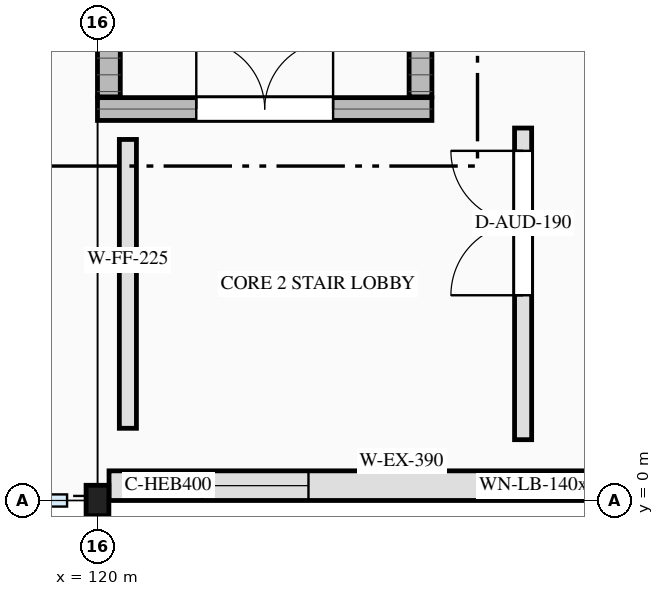
"""IFC4 building model, lengths in metres.
Left out: names, types, materials, properties, quantities, classifications, styles, units other than length and angle.
Written with IfcOpenShell. Run it as: python <this file> out.ifc"""

import sys

from ifc_helpers import new_model, si_unit, direction, frame, frame_2d, origin, origin_2d, place, context, subcontext, project, spatial, rectangle, i_section, extrude, element, fill, save


model = new_model("IFC4")
c1 = context("Model", 3, precision=1e-05, world=origin(), true_north=direction((0.0, 1.0)))
c2 = subcontext(c1, "Body", "Model", "MODEL_VIEW")
j1 = project(units=[si_unit("LENGTHUNIT", "METRE"), si_unit("PLANEANGLEUNIT", "RADIAN")], contexts=[c1])
p1 = place(None, origin())
s1 = spatial("IfcSite", under=j1, at=p1, CompositionType="ELEMENT")
p2 = place(p1, origin())
s2 = spatial("IfcBuilding", under=s1, at=p2, CompositionType="ELEMENT")
p3 = place(p2, frame((0.0, 0.0, 21.8)))
s3 = spatial("IfcBuildingStorey", under=s2, at=p3, CompositionType="ELEMENT", Elevation=21.8)
p4 = place(p3, frame((120.0, 5.15, 0.0), z_axis=(0.0, 0.0, 1.0), x_axis=(1.0, 0.0, 0.0)))
e1 = element("IfcWall", 1, at=p4, inside=s3, PredefinedType="SHEAR", context=c2, shape_type="SweptSolid", body=[
    extrude(rectangle(XDim=4.4, YDim=0.3, at=frame_2d((2.2, 0.0))), origin(), (0.0, 0.0, 1.0), 4.2),
])
p5 = place(p4, frame((1.3, 0.0, 0.0)))
e2 = element("IfcOpeningElement", 2, at=p5, cuts=e1, PredefinedType="OPENING", context=c2, shape_type="SweptSolid", body=[
    extrude(rectangle(XDim=1.8, YDim=2.2, at=frame_2d((0.9, 1.1))), frame((0.0, 0.16, 0.0), z_axis=(0.0, -1.0, 0.0), x_axis=(1.0, 0.0, 0.0)), (0.0, 0.0, 1.0), 0.32),
])
for number, where, z_axis, x_axis in (
    (3, (120.15, 5.31, 0.0), (0.0, 0.0, 1.0), (0.0, 1.0, 0.0)),
    (4, (124.25, 5.31, 0.0), (0.0, 0.0, 1.0), (0.0, 1.0, 0.0)),
):
    element("IfcWall", number, at=place(p3, frame(where, z_axis=z_axis, x_axis=x_axis)), inside=s3, PredefinedType="SHEAR", context=c2, shape_type="SweptSolid", body=[
        extrude(rectangle(XDim=9.38, YDim=0.3, at=frame_2d((4.69, 0.0))), origin(), (0.0, 0.0, 1.0), 4.2),
    ])
p6 = place(p3, frame((120.0, 0.0, 0.0), z_axis=(0.0, 0.0, 1.0), x_axis=(1.0, 0.0, 0.0)))
e5 = element("IfcColumn", 5, at=p6, inside=s3, PredefinedType="COLUMN", context=c2, shape_type="SweptSolid", body=[
    extrude(i_section(OverallWidth=0.3, OverallDepth=0.4, WebThickness=0.013, FlangeThickness=0.024, FilletRadius=0.027, at=origin_2d()), origin(), (0.0, 0.0, 1.0), 4.2),
])
p7 = place(p3, frame((127.848, 0.195, 0.0), z_axis=(0.0, 0.0, 1.0), x_axis=(-1.0, 0.0, 0.0)))
e6 = element("IfcWall", 6, at=p7, inside=s3, PredefinedType="SOLIDWALL", context=c2, shape_type="SweptSolid", body=[
    extrude(rectangle(XDim=7.696, YDim=0.39, at=frame_2d((3.848, 0.0))), origin(), (0.0, 0.0, 1.0), 3.415),
])
p8 = place(p7, frame((1.224, 0.0, 0.85)))
e7 = element("IfcOpeningElement", 7, at=p8, cuts=e6, PredefinedType="OPENING", context=c2, shape_type="SweptSolid", body=[
    extrude(rectangle(XDim=1.4, YDim=1.6, at=frame_2d((0.7, 0.8))), frame((0.0, 0.205, 0.0), z_axis=(0.0, -1.0, 0.0), x_axis=(1.0, 0.0, 0.0)), (0.0, 0.0, 1.0), 0.41),
])
p9 = place(p7, frame((5.072, 0.0, 0.85)))
e8 = element("IfcOpeningElement", 8, at=p9, cuts=e6, PredefinedType="OPENING", context=c2, shape_type="SweptSolid", body=[
    extrude(rectangle(XDim=1.4, YDim=1.6, at=frame_2d((0.7, 0.8))), frame((0.0, 0.205, 0.0), z_axis=(0.0, -1.0, 0.0), x_axis=(1.0, 0.0, 0.0)), (0.0, 0.0, 1.0), 0.41),
])
p10 = place(p3, frame((125.6, 0.8, 0.0), z_axis=(0.0, 0.0, 1.0), x_axis=(0.0, 1.0, 0.0)))
e9 = element("IfcWall", 9, at=p10, inside=s3, PredefinedType="SOLIDWALL", context=c2, shape_type="SweptSolid", body=[
    extrude(rectangle(XDim=4.1, YDim=0.225, at=frame_2d((2.05, 0.0))), origin(), (0.0, 0.0, 1.0), 3.92),
])
p11 = place(p10, frame((1.9, 0.0, 0.0)))
e10 = element("IfcOpeningElement", 10, at=p11, cuts=e9, PredefinedType="OPENING", context=c2, shape_type="SweptSolid", body=[
    extrude(rectangle(XDim=1.9, YDim=2.35, at=frame_2d((0.95, 1.175))), frame((0.0, 0.123, 0.0), z_axis=(0.0, -1.0, 0.0), x_axis=(1.0, 0.0, 0.0)), (0.0, 0.0, 1.0), 0.245),
])
p12 = place(p3, frame((120.4, 0.95, 0.0), z_axis=(0.0, 0.0, 1.0), x_axis=(0.0, 1.0, 0.0)))
e11 = element("IfcWall", 11, at=p12, inside=s3, PredefinedType="SOLIDWALL", context=c2, shape_type="SweptSolid", body=[
    extrude(rectangle(XDim=3.8, YDim=0.225, at=frame_2d((1.9, 0.0))), origin(), (0.0, 0.0, 1.0), 3.92),
])
p13 = place(p8, origin())
e12 = element("IfcWindow", 12, at=p13, inside=s3, PartitioningType="SINGLE_PANEL", PredefinedType="WINDOW", context=c2, shape_type="SweptSolid", body=[
    extrude(rectangle(XDim=1.4, YDim=1.6, at=frame_2d((0.7, 0.8))), frame((0.0, 0.03, 0.0), z_axis=(0.0, -1.0, 0.0), x_axis=(1.0, 0.0, 0.0)), (0.0, 0.0, 1.0), 0.06),
])
fill(e7, e12)
p14 = place(p9, origin())
e13 = element("IfcWindow", 13, at=p14, inside=s3, PartitioningType="SINGLE_PANEL", PredefinedType="WINDOW", context=c2, shape_type="SweptSolid", body=[
    extrude(rectangle(XDim=1.4, YDim=1.6, at=frame_2d((0.7, 0.8))), frame((0.0, 0.03, 0.0), z_axis=(0.0, -1.0, 0.0), x_axis=(1.0, 0.0, 0.0)), (0.0, 0.0, 1.0), 0.06),
])
fill(e8, e13)
p15 = place(p5, origin())
e14 = element("IfcDoor", 14, at=p15, inside=s3, OperationType="DOUBLE_DOOR_SINGLE_SWING", PredefinedType="DOOR", context=c2, shape_type="SweptSolid", body=[
    extrude(rectangle(XDim=1.8, YDim=2.2, at=frame_2d((0.9, 1.1))), frame((0.0, 0.025, 0.0), z_axis=(0.0, -1.0, 0.0), x_axis=(1.0, 0.0, 0.0)), (0.0, 0.0, 1.0), 0.05),
])
fill(e2, e14)
p16 = place(p11, origin())
e15 = element("IfcDoor", 15, at=p16, inside=s3, OperationType="DOUBLE_DOOR_SINGLE_SWING", PredefinedType="DOOR", context=c2, shape_type="SweptSolid", body=[
    extrude(rectangle(XDim=1.9, YDim=2.35, at=frame_2d((0.95, 1.175))), frame((0.0, 0.025, 0.0), z_axis=(0.0, -1.0, 0.0), x_axis=(1.0, 0.0, 0.0)), (0.0, 0.0, 1.0), 0.05),
])
fill(e10, e15)
save(model, sys.argv[1])
